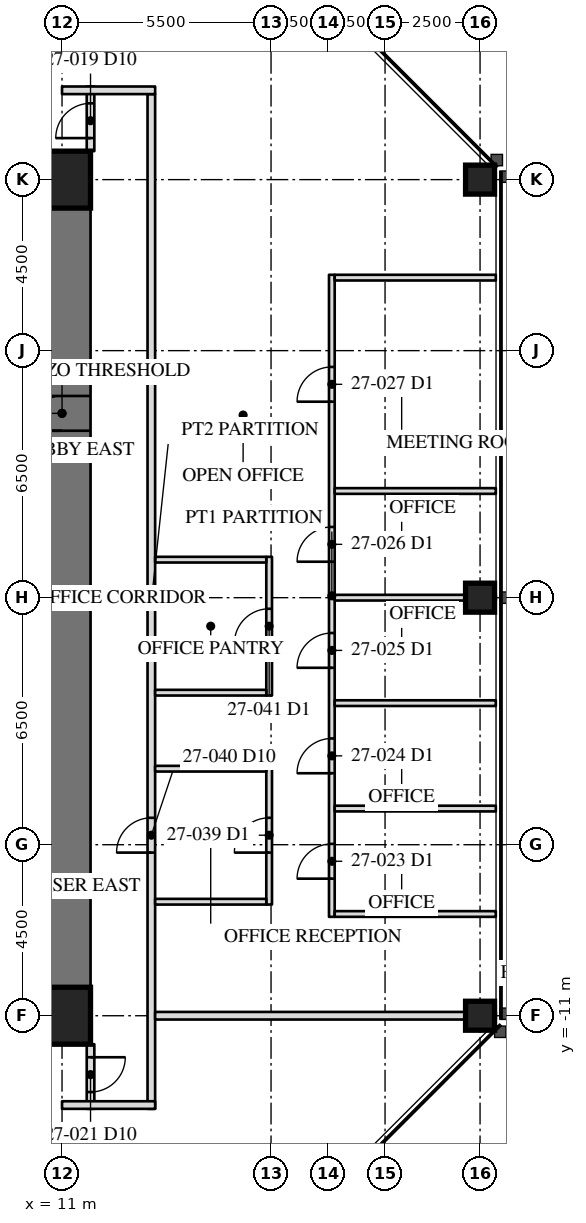
"""IFC4 building model, lengths in metres.
Left out: names, types, materials, properties, quantities, classifications, styles, units other than length and angle.
Written with IfcOpenShell. Run it as: python <this file> out.ifc"""

import sys

from ifc_helpers import new_model, si_unit, direction, frame, frame_2d, origin, origin_2d, place, context, subcontext, project, spatial, rectangle, hollow_rectangle, extrude, element, fill, save


model = new_model("IFC4")
c1 = context("Model", 3, precision=1e-05, world=origin(), true_north=direction((0.0, 1.0)))
c2 = subcontext(c1, "Body", "Model", "MODEL_VIEW")
j1 = project(units=[si_unit("LENGTHUNIT", "METRE"), si_unit("PLANEANGLEUNIT", "RADIAN")], contexts=[c1])
p1 = place(None, origin())
s1 = spatial("IfcSite", under=j1, at=p1, CompositionType="ELEMENT")
p2 = place(p1, origin())
s2 = spatial("IfcBuilding", under=s1, at=p2, CompositionType="ELEMENT")
p3 = place(p2, frame((0.0, 0.0, 117.2)))
s3 = spatial("IfcBuildingStorey", under=s2, at=p3, CompositionType="ELEMENT", Elevation=117.2)
for number, where, z_axis, x_axis in (
    (1, (22.0, -11.0, 0.0), (0.0, 0.0, 1.0), (0.0, 1.0, 0.0)),
    (2, (22.0, 0.0, 0.0), (0.0, 0.0, 1.0), (0.0, 1.0, 0.0)),
    (3, (22.0, 11.0, 0.0), (0.0, 0.0, 1.0), (0.0, 1.0, 0.0)),
):
    element("IfcColumn", number, at=place(p3, frame(where, z_axis=z_axis, x_axis=x_axis)), inside=s3, PredefinedType="COLUMN", context=c2, shape_type="SweptSolid", body=[
        extrude(hollow_rectangle(XDim=0.762, YDim=0.762, WallThickness=0.127, at=origin_2d()), origin(), (0.0, 0.0, 1.0), 4.1),
    ])
p4 = place(p3, frame((11.0, -11.0, 0.0), z_axis=(0.0, 0.0, 1.0), x_axis=(0.0, 1.0, 0.0)))
e4 = element("IfcWall", 4, at=p4, inside=s3, PredefinedType="SHEAR", context=c2, shape_type="SweptSolid", body=[
    extrude(rectangle(XDim=22.0, YDim=1.5, at=frame_2d((11.0, 0.0))), origin(), (0.0, 0.0, 1.0), 4.1),
])
p5 = place(p4, frame((15.393, 0.0, 0.0)))
e5 = element("IfcOpeningElement", 5, at=p5, cuts=e4, PredefinedType="OPENING", context=c2, shape_type="SweptSolid", body=[
    extrude(rectangle(XDim=0.915, YDim=2.134, at=frame_2d((0.458, 1.067))), frame((0.0, 0.76, 0.0), z_axis=(0.0, -1.0, 0.0), x_axis=(1.0, 0.0, 0.0)), (0.0, 0.0, 1.0), 1.52),
])
for number, where, z_axis, x_axis in (
    (6, (11.0, 11.0, 0.0), (0.0, 0.0, 1.0), (-1.0, 0.0, 0.0)),
    (7, (6.5, -11.0, 0.0), (0.0, 0.0, 1.0), (1.0, 0.0, 0.0)),
):
    element("IfcWall", number, at=place(p3, frame(where, z_axis=z_axis, x_axis=x_axis)), inside=s3, PredefinedType="SHEAR", context=c2, shape_type="SweptSolid", body=[
        extrude(rectangle(XDim=4.5, YDim=1.5, at=frame_2d((2.25, 0.0))), origin(), (0.0, 0.0, 1.0), 4.1),
    ])
for number, where, z_axis, x_axis in (
    (8, (11.0, 11.0, 0.0), (0.0, 0.0, 1.0), (1.0, 0.0, 0.0)),
    (9, (11.0, -11.0, 0.0), (0.0, 0.0, 1.0), (1.0, 0.0, 0.0)),
):
    element("IfcColumn", number, at=place(p3, frame(where, z_axis=z_axis, x_axis=x_axis)), inside=s3, PredefinedType="COLUMN", context=c2, shape_type="SweptSolid", body=[
        extrude(hollow_rectangle(XDim=1.499, YDim=1.499, WallThickness=0.102, at=origin_2d()), origin(), (0.0, 0.0, 1.0), 4.1),
    ])
p6 = place(p3, frame((13.35, -13.45, 0.0), z_axis=(0.0, 0.0, 1.0), x_axis=(0.0, 1.0, 0.0)))
e10 = element("IfcWall", 10, at=p6, inside=s3, PredefinedType="PARTITIONING", context=c2, shape_type="SweptSolid", body=[
    extrude(rectangle(XDim=26.7, YDim=0.2, at=frame_2d((13.35, 0.0))), origin(), (0.0, 0.0, 1.0), 3.91),
])
p7 = place(p6, frame((6.742, 0.0, 0.0)))
e11 = element("IfcOpeningElement", 11, at=p7, cuts=e10, PredefinedType="OPENING", context=c2, shape_type="SweptSolid", body=[
    extrude(rectangle(XDim=0.915, YDim=2.134, at=frame_2d((0.458, 1.067))), frame((0.0, 0.11, 0.0), z_axis=(0.0, -1.0, 0.0), x_axis=(1.0, 0.0, 0.0)), (0.0, 0.0, 1.0), 0.22),
])
p8 = place(p3, frame((11.75, 11.75, 0.0), z_axis=(0.0, 0.0, 1.0), x_axis=(0.0, 1.0, 0.0)))
e12 = element("IfcWall", 12, at=p8, inside=s3, PredefinedType="PARTITIONING", context=c2, shape_type="SweptSolid", body=[
    extrude(rectangle(XDim=1.7, YDim=0.2, at=frame_2d((0.85, 0.0))), origin(), (0.0, 0.0, 1.0), 3.91),
])
p9 = place(p8, frame((0.343, 0.0, 0.0)))
e13 = element("IfcOpeningElement", 13, at=p9, cuts=e12, PredefinedType="OPENING", context=c2, shape_type="SweptSolid", body=[
    extrude(rectangle(XDim=0.915, YDim=2.134, at=frame_2d((0.458, 1.067))), frame((0.0, 0.11, 0.0), z_axis=(0.0, -1.0, 0.0), x_axis=(1.0, 0.0, 0.0)), (0.0, 0.0, 1.0), 0.22),
])
p10 = place(p3, frame((11.0, 13.35, 0.0), z_axis=(0.0, 0.0, 1.0), x_axis=(1.0, 0.0, 0.0)))
e14 = element("IfcWall", 14, at=p10, inside=s3, PredefinedType="PARTITIONING", context=c2, shape_type="SweptSolid", body=[
    extrude(rectangle(XDim=2.45, YDim=0.2, at=frame_2d((1.225, 0.0))), origin(), (0.0, 0.0, 1.0), 3.91),
])
p11 = place(p3, frame((11.75, -11.75, 0.0), z_axis=(0.0, 0.0, 1.0), x_axis=(0.0, -1.0, 0.0)))
e15 = element("IfcWall", 15, at=p11, inside=s3, PredefinedType="PARTITIONING", context=c2, shape_type="SweptSolid", body=[
    extrude(rectangle(XDim=1.7, YDim=0.2, at=frame_2d((0.85, 0.0))), origin(), (0.0, 0.0, 1.0), 3.91),
])
p12 = place(p11, frame((0.343, 0.0, 0.0)))
e16 = element("IfcOpeningElement", 16, at=p12, cuts=e15, PredefinedType="OPENING", context=c2, shape_type="SweptSolid", body=[
    extrude(rectangle(XDim=0.915, YDim=2.134, at=frame_2d((0.458, 1.067))), frame((0.0, 0.11, 0.0), z_axis=(0.0, -1.0, 0.0), x_axis=(1.0, 0.0, 0.0)), (0.0, 0.0, 1.0), 0.22),
])
p13 = place(p3, frame((11.0, -13.35, 0.0), z_axis=(0.0, 0.0, 1.0), x_axis=(1.0, 0.0, 0.0)))
e17 = element("IfcWall", 17, at=p13, inside=s3, PredefinedType="PARTITIONING", context=c2, shape_type="SweptSolid", body=[
    extrude(rectangle(XDim=2.45, YDim=0.2, at=frame_2d((1.225, 0.0))), origin(), (0.0, 0.0, 1.0), 3.91),
])
p14 = place(p3, frame((13.45, -11.0, 0.0), z_axis=(0.0, 0.0, 1.0), x_axis=(1.0, 0.0, 0.0)))
e18 = element("IfcWall", 18, at=p14, inside=s3, PredefinedType="PARTITIONING", context=c2, shape_type="SweptSolid", body=[
    extrude(rectangle(XDim=8.965, YDim=0.2, at=frame_2d((4.482, 0.0))), origin(), (0.0, 0.0, 1.0), 3.326),
])
p15 = place(p3, frame((18.1, -8.398, 0.0), z_axis=(0.0, 0.0, 1.0), x_axis=(0.0, 1.0, 0.0)))
e19 = element("IfcWall", 19, at=p15, inside=s3, PredefinedType="PARTITIONING", context=c2, shape_type="SweptSolid", body=[
    extrude(rectangle(XDim=16.894, YDim=0.15, at=frame_2d((8.447, 0.0))), origin(), (0.0, 0.0, 1.0), 3.91),
])
p16 = place(p15, frame((1.004, 0.0, 0.0)))
e20 = element("IfcOpeningElement", 20, at=p16, cuts=e19, PredefinedType="OPENING", context=c2, shape_type="SweptSolid", body=[
    extrude(rectangle(XDim=0.915, YDim=2.134, at=frame_2d((0.458, 1.067))), frame((0.0, 0.085, 0.0), z_axis=(0.0, -1.0, 0.0), x_axis=(1.0, 0.0, 0.0)), (0.0, 0.0, 1.0), 0.17),
])
p17 = place(p15, frame((3.779, 0.0, 0.0)))
e21 = element("IfcOpeningElement", 21, at=p17, cuts=e19, PredefinedType="OPENING", context=c2, shape_type="SweptSolid", body=[
    extrude(rectangle(XDim=0.915, YDim=2.134, at=frame_2d((0.458, 1.067))), frame((0.0, 0.085, 0.0), z_axis=(0.0, -1.0, 0.0), x_axis=(1.0, 0.0, 0.0)), (0.0, 0.0, 1.0), 0.17),
])
p18 = place(p15, frame((6.553, 0.0, 0.0)))
e22 = element("IfcOpeningElement", 22, at=p18, cuts=e19, PredefinedType="OPENING", context=c2, shape_type="SweptSolid", body=[
    extrude(rectangle(XDim=0.915, YDim=2.134, at=frame_2d((0.458, 1.067))), frame((0.0, 0.085, 0.0), z_axis=(0.0, -1.0, 0.0), x_axis=(1.0, 0.0, 0.0)), (0.0, 0.0, 1.0), 0.17),
])
p19 = place(p15, frame((9.344, 0.0, 0.0)))
e23 = element("IfcOpeningElement", 23, at=p19, cuts=e19, PredefinedType="OPENING", context=c2, shape_type="SweptSolid", body=[
    extrude(rectangle(XDim=0.915, YDim=2.134, at=frame_2d((0.458, 1.067))), frame((0.0, 0.085, 0.0), z_axis=(0.0, -1.0, 0.0), x_axis=(1.0, 0.0, 0.0)), (0.0, 0.0, 1.0), 0.17),
])
p20 = place(p15, frame((13.554, 0.0, 0.0)))
e24 = element("IfcOpeningElement", 24, at=p20, cuts=e19, PredefinedType="OPENING", context=c2, shape_type="SweptSolid", body=[
    extrude(rectangle(XDim=0.915, YDim=2.134, at=frame_2d((0.458, 1.067))), frame((0.0, 0.085, 0.0), z_axis=(0.0, -1.0, 0.0), x_axis=(1.0, 0.0, 0.0)), (0.0, 0.0, 1.0), 0.17),
])
for number, where, z_axis, x_axis in (
    (25, (18.175, -8.323, 0.0), (0.0, 0.0, 1.0), (1.0, 0.0, 0.0)),
    (26, (18.175, -5.549, 0.0), (0.0, 0.0, 1.0), (1.0, 0.0, 0.0)),
    (27, (18.175, -2.775, 0.0), (0.0, 0.0, 1.0), (1.0, 0.0, 0.0)),
):
    element("IfcWall", number, at=place(p3, frame(where, z_axis=z_axis, x_axis=x_axis)), inside=s3, PredefinedType="PARTITIONING", context=c2, shape_type="SweptSolid", body=[
        extrude(rectangle(XDim=4.24, YDim=0.15, at=frame_2d((2.12, 0.0))), origin(), (0.0, 0.0, 1.0), 3.91),
    ])
p21 = place(p3, frame((18.175, 0.0, 0.0), z_axis=(0.0, 0.0, 1.0), x_axis=(1.0, 0.0, 0.0)))
e28 = element("IfcWall", 28, at=p21, inside=s3, PredefinedType="PARTITIONING", context=c2, shape_type="SweptSolid", body=[
    extrude(rectangle(XDim=4.24, YDim=0.15, at=frame_2d((2.12, 0.0))), origin(), (0.0, 0.0, 1.0), 3.326),
])
for number, where, z_axis, x_axis in (
    (29, (18.175, 2.807, 0.0), (0.0, 0.0, 1.0), (1.0, 0.0, 0.0)),
    (30, (18.175, 8.421, 0.0), (0.0, 0.0, 1.0), (1.0, 0.0, 0.0)),
):
    element("IfcWall", number, at=place(p3, frame(where, z_axis=z_axis, x_axis=x_axis)), inside=s3, PredefinedType="PARTITIONING", context=c2, shape_type="SweptSolid", body=[
        extrude(rectangle(XDim=4.24, YDim=0.15, at=frame_2d((2.12, 0.0))), origin(), (0.0, 0.0, 1.0), 3.91),
    ])
p22 = place(p3, frame((16.45, -8.075, 0.0), z_axis=(0.0, 0.0, 1.0), x_axis=(0.0, 1.0, 0.0)))
e31 = element("IfcWall", 31, at=p22, inside=s3, PredefinedType="PARTITIONING", context=c2, shape_type="SweptSolid", body=[
    extrude(rectangle(XDim=3.65, YDim=0.15, at=frame_2d((1.825, 0.0))), origin(), (0.0, 0.0, 1.0), 3.91),
])
p23 = place(p22, frame((1.367, 0.0, 0.0)))
e32 = element("IfcOpeningElement", 32, at=p23, cuts=e31, PredefinedType="OPENING", context=c2, shape_type="SweptSolid", body=[
    extrude(rectangle(XDim=0.915, YDim=2.134, at=frame_2d((0.458, 1.067))), frame((0.0, 0.085, 0.0), z_axis=(0.0, -1.0, 0.0), x_axis=(1.0, 0.0, 0.0)), (0.0, 0.0, 1.0), 0.17),
])
for number, where, z_axis, x_axis in (
    (33, (16.375, -8.0, 0.0), (0.0, 0.0, 1.0), (-1.0, 0.0, 0.0)),
    (34, (16.375, -4.5, 0.0), (0.0, 0.0, 1.0), (-1.0, 0.0, 0.0)),
):
    element("IfcWall", number, at=place(p3, frame(where, z_axis=z_axis, x_axis=x_axis)), inside=s3, PredefinedType="PARTITIONING", context=c2, shape_type="SweptSolid", body=[
        extrude(rectangle(XDim=2.925, YDim=0.15, at=frame_2d((1.462, 0.0))), origin(), (0.0, 0.0, 1.0), 3.91),
    ])
p24 = place(p3, frame((16.45, -2.575, 0.0), z_axis=(0.0, 0.0, 1.0), x_axis=(0.0, 1.0, 0.0)))
e35 = element("IfcWall", 35, at=p24, inside=s3, PredefinedType="PARTITIONING", context=c2, shape_type="SweptSolid", body=[
    extrude(rectangle(XDim=3.65, YDim=0.15, at=frame_2d((1.825, 0.0))), origin(), (0.0, 0.0, 1.0), 3.91),
])
p25 = place(p24, frame((1.367, 0.0, 0.0)))
e36 = element("IfcOpeningElement", 36, at=p25, cuts=e35, PredefinedType="OPENING", context=c2, shape_type="SweptSolid", body=[
    extrude(rectangle(XDim=0.915, YDim=2.134, at=frame_2d((0.458, 1.067))), frame((0.0, 0.085, 0.0), z_axis=(0.0, -1.0, 0.0), x_axis=(1.0, 0.0, 0.0)), (0.0, 0.0, 1.0), 0.17),
])
for number, where, z_axis, x_axis in (
    (37, (16.375, -2.5, 0.0), (0.0, 0.0, 1.0), (-1.0, 0.0, 0.0)),
    (38, (16.375, 1.0, 0.0), (0.0, 0.0, 1.0), (-1.0, 0.0, 0.0)),
):
    element("IfcWall", number, at=place(p3, frame(where, z_axis=z_axis, x_axis=x_axis)), inside=s3, PredefinedType="PARTITIONING", context=c2, shape_type="SweptSolid", body=[
        extrude(rectangle(XDim=2.925, YDim=0.15, at=frame_2d((1.462, 0.0))), origin(), (0.0, 0.0, 1.0), 3.91),
    ])
p26 = place(p5, origin())
e39 = element("IfcDoor", 39, at=p26, inside=s3, OperationType="SINGLE_SWING_RIGHT", PredefinedType="DOOR", context=c2, shape_type="SweptSolid", body=[
    extrude(rectangle(XDim=0.915, YDim=2.134, at=frame_2d((0.458, 1.067))), frame((0.0, -0.675, 0.0), z_axis=(0.0, -1.0, 0.0), x_axis=(1.0, 0.0, 0.0)), (0.0, 0.0, 1.0), 0.05),
])
fill(e5, e39)
p27 = place(p9, origin())
e40 = element("IfcDoor", 40, at=p27, inside=s3, OperationType="SINGLE_SWING_LEFT", PredefinedType="DOOR", context=c2, shape_type="SweptSolid", body=[
    extrude(rectangle(XDim=0.915, YDim=2.134, at=frame_2d((0.458, 1.067))), frame((0.0, 0.025, 0.0), z_axis=(0.0, -1.0, 0.0), x_axis=(1.0, 0.0, 0.0)), (0.0, 0.0, 1.0), 0.05),
])
fill(e13, e40)
p28 = place(p12, origin())
e41 = element("IfcDoor", 41, at=p28, inside=s3, OperationType="SINGLE_SWING_LEFT", PredefinedType="DOOR", context=c2, shape_type="SweptSolid", body=[
    extrude(rectangle(XDim=0.915, YDim=2.134, at=frame_2d((0.458, 1.067))), frame((0.0, 0.025, 0.0), z_axis=(0.0, -1.0, 0.0), x_axis=(1.0, 0.0, 0.0)), (0.0, 0.0, 1.0), 0.05),
])
fill(e16, e41)
p29 = place(p16, origin())
e42 = element("IfcDoor", 42, at=p29, inside=s3, OperationType="SINGLE_SWING_LEFT", PredefinedType="DOOR", context=c2, shape_type="SweptSolid", body=[
    extrude(rectangle(XDim=0.915, YDim=2.134, at=frame_2d((0.458, 1.067))), frame((0.0, 0.025, 0.0), z_axis=(0.0, -1.0, 0.0), x_axis=(1.0, 0.0, 0.0)), (0.0, 0.0, 1.0), 0.05),
])
fill(e20, e42)
p30 = place(p17, origin())
e43 = element("IfcDoor", 43, at=p30, inside=s3, OperationType="SINGLE_SWING_LEFT", PredefinedType="DOOR", context=c2, shape_type="SweptSolid", body=[
    extrude(rectangle(XDim=0.915, YDim=2.134, at=frame_2d((0.458, 1.067))), frame((0.0, 0.025, 0.0), z_axis=(0.0, -1.0, 0.0), x_axis=(1.0, 0.0, 0.0)), (0.0, 0.0, 1.0), 0.05),
])
fill(e21, e43)
p31 = place(p18, origin())
e44 = element("IfcDoor", 44, at=p31, inside=s3, OperationType="SINGLE_SWING_LEFT", PredefinedType="DOOR", context=c2, shape_type="SweptSolid", body=[
    extrude(rectangle(XDim=0.915, YDim=2.134, at=frame_2d((0.458, 1.067))), frame((0.0, 0.025, 0.0), z_axis=(0.0, -1.0, 0.0), x_axis=(1.0, 0.0, 0.0)), (0.0, 0.0, 1.0), 0.05),
])
fill(e22, e44)
p32 = place(p19, origin())
e45 = element("IfcDoor", 45, at=p32, inside=s3, OperationType="SINGLE_SWING_LEFT", PredefinedType="DOOR", context=c2, shape_type="SweptSolid", body=[
    extrude(rectangle(XDim=0.915, YDim=2.134, at=frame_2d((0.458, 1.067))), frame((0.0, 0.025, 0.0), z_axis=(0.0, -1.0, 0.0), x_axis=(1.0, 0.0, 0.0)), (0.0, 0.0, 1.0), 0.05),
])
fill(e23, e45)
p33 = place(p20, origin())
e46 = element("IfcDoor", 46, at=p33, inside=s3, OperationType="SINGLE_SWING_LEFT", PredefinedType="DOOR", context=c2, shape_type="SweptSolid", body=[
    extrude(rectangle(XDim=0.915, YDim=2.134, at=frame_2d((0.458, 1.067))), frame((0.0, 0.025, 0.0), z_axis=(0.0, -1.0, 0.0), x_axis=(1.0, 0.0, 0.0)), (0.0, 0.0, 1.0), 0.05),
])
fill(e24, e46)
p34 = place(p23, origin())
e47 = element("IfcDoor", 47, at=p34, inside=s3, OperationType="SINGLE_SWING_LEFT", PredefinedType="DOOR", context=c2, shape_type="SweptSolid", body=[
    extrude(rectangle(XDim=0.915, YDim=2.134, at=frame_2d((0.458, 1.067))), frame((0.0, 0.025, 0.0), z_axis=(0.0, -1.0, 0.0), x_axis=(1.0, 0.0, 0.0)), (0.0, 0.0, 1.0), 0.05),
])
fill(e32, e47)
p35 = place(p7, origin())
e48 = element("IfcDoor", 48, at=p35, inside=s3, OperationType="SINGLE_SWING_LEFT", PredefinedType="DOOR", context=c2, shape_type="SweptSolid", body=[
    extrude(rectangle(XDim=0.915, YDim=2.134, at=frame_2d((0.458, 1.067))), frame((0.0, 0.025, 0.0), z_axis=(0.0, -1.0, 0.0), x_axis=(1.0, 0.0, 0.0)), (0.0, 0.0, 1.0), 0.05),
])
fill(e11, e48)
p36 = place(p25, origin())
e49 = element("IfcDoor", 49, at=p36, inside=s3, OperationType="SINGLE_SWING_LEFT", PredefinedType="DOOR", context=c2, shape_type="SweptSolid", body=[
    extrude(rectangle(XDim=0.915, YDim=2.134, at=frame_2d((0.458, 1.067))), frame((0.0, 0.025, 0.0), z_axis=(0.0, -1.0, 0.0), x_axis=(1.0, 0.0, 0.0)), (0.0, 0.0, 1.0), 0.05),
])
fill(e36, e49)
save(model, sys.argv[1])
